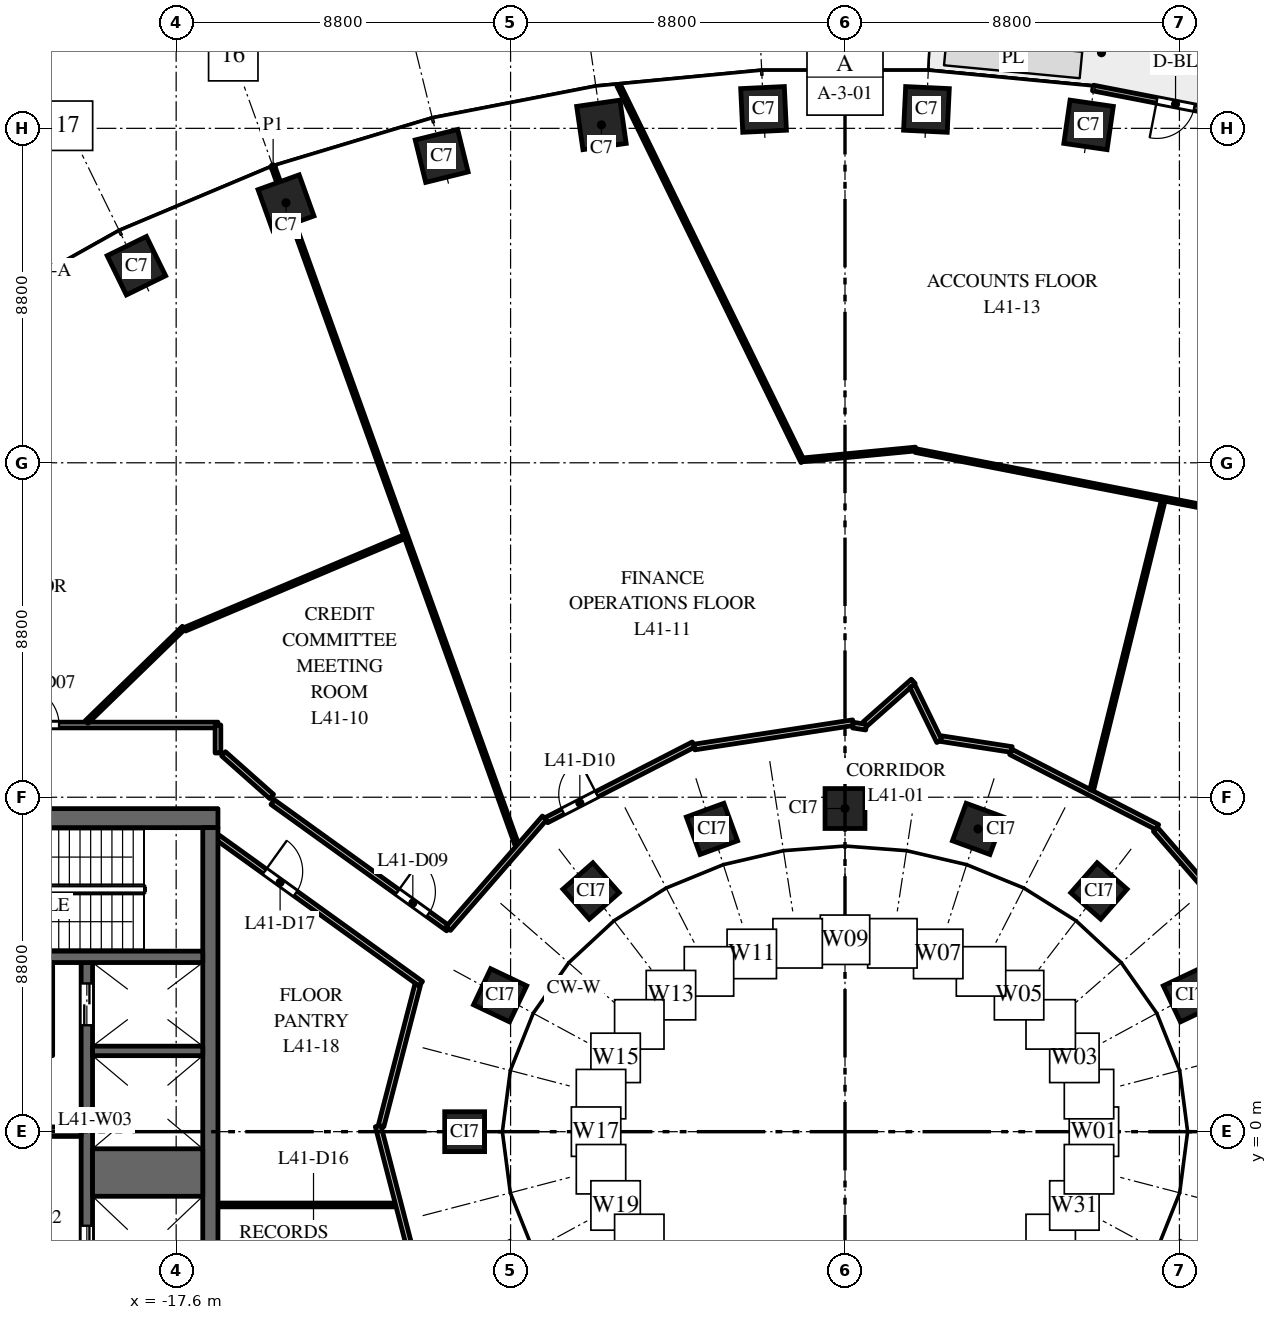
"""IFC4 building model, lengths in metres.
Left out: names, types, materials, properties, quantities, classifications, styles, units other than length and angle.
Written with IfcOpenShell. Run it as: python <this file> out.ifc"""

import sys

from ifc_helpers import new_model, si_unit, direction, frame, frame_2d, origin, origin_2d, place, context, subcontext, project, spatial, rectangle, extrude, element, fill, save


model = new_model("IFC4")
c1 = context("Model", 3, precision=1e-05, world=origin(), true_north=direction((0.0, 1.0)))
c2 = subcontext(c1, "Body", "Model", "MODEL_VIEW")
j1 = project(units=[si_unit("LENGTHUNIT", "METRE"), si_unit("PLANEANGLEUNIT", "RADIAN")], contexts=[c1])
p1 = place(None, origin())
s1 = spatial("IfcSite", under=j1, at=p1, CompositionType="ELEMENT")
p2 = place(p1, origin())
s2 = spatial("IfcBuilding", under=s1, at=p2, CompositionType="ELEMENT")
p3 = place(p2, frame((0.0, 0.0, 178.0)))
s3 = spatial("IfcBuildingStorey", under=s2, at=p3, CompositionType="ELEMENT", Elevation=178.0)
for number, where, z_axis, x_axis in (
    (1, (6.409, 26.491, 0.0), (0.0, 0.0, 1.0), (-0.99, 0.143, 0.0)),
    (2, (2.143, 26.898, 0.0), (0.0, 0.0, 1.0), (-0.999, 0.048, 0.0)),
    (3, (-2.143, 26.898, 0.0), (0.0, 0.0, 1.0), (-0.999, -0.048, 0.0)),
    (4, (-6.409, 26.491, 0.0), (0.0, 0.0, 1.0), (-0.99, -0.143, 0.0)),
    (5, (-10.613, 25.674, 0.0), (0.0, 0.0, 1.0), (-0.971, -0.24, 0.0)),
    (6, (-14.709, 24.441, 0.0), (0.0, 0.0, 1.0), (-0.941, -0.338, 0.0)),
    (7, (-18.646, 22.785, 0.0), (0.0, 0.0, 1.0), (-0.898, -0.439, 0.0)),
):
    element("IfcColumn", number, at=place(p3, frame(where, z_axis=z_axis, x_axis=x_axis)), inside=s3, PredefinedType="COLUMN", context=c2, shape_type="SweptSolid", body=[
        extrude(rectangle(XDim=1.15, YDim=1.15, at=origin_2d()), origin(), (0.0, 0.0, 1.0), 4.0),
    ])
for number, where, z_axis, x_axis in (
    (8, (9.076, 3.588, 0.0), (0.0, 0.0, 1.0), (-0.429, 0.903, 0.0)),
    (9, (6.682, 6.334, 0.0), (0.0, 0.0, 1.0), (-0.751, 0.66, 0.0)),
    (10, (3.501, 7.967, 0.0), (0.0, 0.0, 1.0), (-0.939, 0.344, 0.0)),
    (11, (0.0, 8.503, 0.0), (0.0, 0.0, 1.0), (-1.0, 0.0, 0.0)),
    (12, (-3.501, 7.967, 0.0), (0.0, 0.0, 1.0), (-0.939, -0.344, 0.0)),
    (13, (-6.682, 6.334, 0.0), (0.0, 0.0, 1.0), (-0.751, -0.66, 0.0)),
    (14, (-9.076, 3.588, 0.0), (0.0, 0.0, 1.0), (-0.429, -0.903, 0.0)),
    (15, (-10.008, 0.0, 0.0), (0.0, 0.0, 1.0), (0.0, -1.0, 0.0)),
):
    element("IfcColumn", number, at=place(p3, frame(where, z_axis=z_axis, x_axis=x_axis)), inside=s3, PredefinedType="COLUMN", context=c2, shape_type="SweptSolid", body=[
        extrude(rectangle(XDim=1.05, YDim=1.05, at=origin_2d()), origin(), (0.0, 0.0, 1.0), 4.0),
    ])
p4 = place(p3, frame((-16.5, 8.25, 0.0), z_axis=(0.0, 0.0, 1.0), x_axis=(-1.0, 0.0, 0.0)))
e16 = element("IfcWall", 16, at=p4, inside=s3, PredefinedType="SHEAR", context=c2, shape_type="SweptSolid", body=[
    extrude(rectangle(XDim=15.0, YDim=0.5, at=frame_2d((7.5, 0.0))), origin(), (0.0, 0.0, 1.0), 3.7),
])
p5 = place(p4, frame((6.9, 0.0, 0.0)))
e17 = element("IfcOpeningElement", 17, at=p5, cuts=e16, PredefinedType="OPENING", context=c2, shape_type="SweptSolid", body=[
    extrude(rectangle(XDim=1.2, YDim=2.1, at=frame_2d((0.6, 1.05))), frame((0.0, 0.26, 0.0), z_axis=(0.0, -1.0, 0.0), x_axis=(1.0, 0.0, 0.0)), (0.0, 0.0, 1.0), 0.52),
])
p6 = place(p4, frame((12.95, 0.0, 0.0)))
e18 = element("IfcOpeningElement", 18, at=p6, cuts=e16, PredefinedType="OPENING", context=c2, shape_type="SweptSolid", body=[
    extrude(rectangle(XDim=0.9, YDim=2.1, at=frame_2d((0.45, 1.05))), frame((0.0, 0.26, 0.0), z_axis=(0.0, -1.0, 0.0), x_axis=(1.0, 0.0, 0.0)), (0.0, 0.0, 1.0), 0.52),
])
p7 = place(p3, frame((-19.95, -4.45, 0.0), z_axis=(0.0, 0.0, 1.0), x_axis=(0.0, 1.0, 0.0)))
e19 = element("IfcWall", 19, at=p7, inside=s3, PredefinedType="SHEAR", context=c2, shape_type="SweptSolid", body=[
    extrude(rectangle(XDim=8.9, YDim=0.3, at=frame_2d((4.45, 0.0))), origin(), (0.0, 0.0, 1.0), 3.7),
])
p8 = place(p7, frame((0.775, 0.0, 0.0)))
e20 = element("IfcOpeningElement", 20, at=p8, cuts=e19, PredefinedType="OPENING", context=c2, shape_type="SweptSolid", body=[
    extrude(rectangle(XDim=1.2, YDim=2.1, at=frame_2d((0.6, 1.05))), frame((0.0, 0.16, 0.0), z_axis=(0.0, -1.0, 0.0), x_axis=(1.0, 0.0, 0.0)), (0.0, 0.0, 1.0), 0.32),
])
p9 = place(p7, frame((7.25, 0.0, 0.0)))
e21 = element("IfcOpeningElement", 21, at=p9, cuts=e19, PredefinedType="OPENING", context=c2, shape_type="SweptSolid", body=[
    extrude(rectangle(XDim=1.1, YDim=2.1, at=frame_2d((0.55, 1.05))), frame((0.0, 0.16, 0.0), z_axis=(0.0, -1.0, 0.0), x_axis=(1.0, 0.0, 0.0)), (0.0, 0.0, 1.0), 0.32),
])
p10 = place(p3, frame((-20.1, 0.0, 0.0), z_axis=(0.0, 0.0, 1.0), x_axis=(-1.0, 0.0, 0.0)))
e22 = element("IfcWall", 22, at=p10, inside=s3, PredefinedType="SHEAR", context=c2, shape_type="SweptSolid", body=[
    extrude(rectangle(XDim=3.28, YDim=0.25, at=frame_2d((1.64, 0.0))), origin(), (0.0, 0.0, 1.0), 3.7),
])
p11 = place(p3, frame((-16.7, -8.0, 0.0), z_axis=(0.0, 0.0, 1.0), x_axis=(0.0, 1.0, 0.0)))
e23 = element("IfcWall", 23, at=p11, inside=s3, PredefinedType="SHEAR", context=c2, shape_type="SweptSolid", body=[
    extrude(rectangle(XDim=16.0, YDim=0.4, at=frame_2d((8.0, 0.0))), origin(), (0.0, 0.0, 1.0), 3.7),
])
p12 = place(p3, frame((-16.9, -1.075, 0.0), z_axis=(0.0, 0.0, 1.0), x_axis=(-1.0, 0.0, 0.0)))
e24 = element("IfcWall", 24, at=p12, inside=s3, PredefinedType="SHEAR", context=c2, shape_type="SweptSolid", body=[
    extrude(rectangle(XDim=2.9, YDim=1.25, at=frame_2d((1.45, 0.0))), origin(), (0.0, 0.0, 1.0), 3.7),
])
p13 = place(p3, frame((-16.9, 2.125, 0.0), z_axis=(0.0, 0.0, 1.0), x_axis=(-1.0, 0.0, 0.0)))
e25 = element("IfcWall", 25, at=p13, inside=s3, PredefinedType="SHEAR", context=c2, shape_type="SweptSolid", body=[
    extrude(rectangle(XDim=2.9, YDim=0.25, at=frame_2d((1.45, 0.0))), origin(), (0.0, 0.0, 1.0), 3.7),
])
p14 = place(p3, frame((-16.9, 4.6, 0.0), z_axis=(0.0, 0.0, 1.0), x_axis=(-1.0, 0.0, 0.0)))
e26 = element("IfcWall", 26, at=p14, inside=s3, PredefinedType="SHEAR", context=c2, shape_type="SweptSolid", body=[
    extrude(rectangle(XDim=6.18, YDim=0.3, at=frame_2d((3.09, 0.0))), origin(), (0.0, 0.0, 1.0), 3.7),
])
p15 = place(p14, frame((4.9, 0.0, 0.0)))
e27 = element("IfcOpeningElement", 27, at=p15, cuts=e26, PredefinedType="OPENING", context=c2, shape_type="SweptSolid", body=[
    extrude(rectangle(XDim=1.1, YDim=2.1, at=frame_2d((0.55, 1.05))), frame((0.0, 0.16, 0.0), z_axis=(0.0, -1.0, 0.0), x_axis=(1.0, 0.0, 0.0)), (0.0, 0.0, 1.0), 0.32),
])
p16 = place(p3, frame((-20.85, 2.125, 0.0), z_axis=(0.0, 0.0, 1.0), x_axis=(-1.0, 0.0, 0.0)))
e28 = element("IfcWall", 28, at=p16, inside=s3, PredefinedType="SHEAR", context=c2, shape_type="SweptSolid", body=[
    extrude(rectangle(XDim=2.53, YDim=0.25, at=frame_2d((1.265, 0.0))), origin(), (0.0, 0.0, 1.0), 3.7),
])
p17 = place(p3, frame((-20.975, 2.25, 0.0), z_axis=(0.0, 0.0, 1.0), x_axis=(0.0, 1.0, 0.0)))
e29 = element("IfcWall", 29, at=p17, inside=s3, PredefinedType="SHEAR", context=c2, shape_type="SweptSolid", body=[
    extrude(rectangle(XDim=2.2, YDim=0.25, at=frame_2d((1.1, 0.0))), origin(), (0.0, 0.0, 1.0), 3.7),
])
p18 = place(p3, frame((10.871, 26.617, 0.0), z_axis=(0.0, 0.0, 1.0), x_axis=(-0.981631174778, 0.190788460615, 0.0)))
e30 = element("IfcWall", 30, at=p18, inside=s3, PredefinedType="STANDARD", context=c2, shape_type="SweptSolid", body=[
    extrude(rectangle(XDim=4.426, YDim=0.15, at=frame_2d((2.213, 0.0))), origin(), (0.0, 0.0, 1.0), 3.7),
])
p19 = place(p18, frame((1.713, 0.0, 0.0)))
e31 = element("IfcOpeningElement", 31, at=p19, cuts=e30, PredefinedType="OPENING", context=c2, shape_type="SweptSolid", body=[
    extrude(rectangle(XDim=1.0, YDim=2.4, at=frame_2d((0.5, 1.2))), frame((0.0, 0.085, 0.0), z_axis=(0.0, -1.0, 0.0), x_axis=(1.0, 0.0, 0.0)), (0.0, 0.0, 1.0), 0.17),
])
p20 = place(p3, frame((-31.5, 10.7, 0.0), z_axis=(0.0, 0.0, 1.0), x_axis=(1.0, 0.0, 0.0)))
e32 = element("IfcWall", 32, at=p20, inside=s3, PredefinedType="PARTITIONING", context=c2, shape_type="SweptSolid", body=[
    extrude(rectangle(XDim=15.0, YDim=0.15, at=frame_2d((7.5, 0.0))), origin(), (0.0, 0.0, 1.0), 3.1),
])
p21 = place(p20, frame((9.819, 0.0, 0.0)))
e33 = element("IfcOpeningElement", 33, at=p21, cuts=e32, PredefinedType="OPENING", context=c2, shape_type="SweptSolid", body=[
    extrude(rectangle(XDim=1.0, YDim=2.1, at=frame_2d((0.5, 1.05))), frame((0.0, 0.085, 0.0), z_axis=(0.0, -1.0, 0.0), x_axis=(1.0, 0.0, 0.0)), (0.0, 0.0, 1.0), 0.17),
])
p22 = place(p3, frame((-19.957, 10.778, 0.0), z_axis=(0.0, 0.0, 1.0), x_axis=(0.717304806733, 0.696759509614, 0.0)))
e34 = element("IfcWall", 34, at=p22, inside=s3, PredefinedType="PARTITIONING", context=c2, shape_type="SweptSolid", body=[
    extrude(rectangle(XDim=3.565, YDim=0.1, at=frame_2d((1.782, 0.0))), origin(), (0.0, 0.0, 1.0), 2.75),
])
p23 = place(p3, frame((-17.372, 13.219, 0.0), z_axis=(0.0, 0.0, 1.0), x_axis=(0.921428289763, 0.38854846136, 0.0)))
e35 = element("IfcWall", 35, at=p23, inside=s3, PredefinedType="PARTITIONING", context=c2, shape_type="SweptSolid", body=[
    extrude(rectangle(XDim=6.262, YDim=0.1, at=frame_2d((3.131, 0.0))), origin(), (0.0, 0.0, 1.0), 2.85),
])
p24 = place(p3, frame((-16.5, -1.928, 0.0), z_axis=(0.0, 0.0, 1.0), x_axis=(1.0, 0.0, 0.0)))
e36 = element("IfcWall", 36, at=p24, inside=s3, PredefinedType="PARTITIONING", context=c2, shape_type="SweptSolid", body=[
    extrude(rectangle(XDim=4.672, YDim=0.1, at=frame_2d((2.336, 0.0))), origin(), (0.0, 0.0, 1.0), 3.7),
])
p25 = place(p3, frame((-16.5, 9.964, 0.0), z_axis=(0.0, 0.0, 1.0), x_axis=(0.0, 1.0, 0.0)))
e37 = element("IfcWall", 37, at=p25, inside=s3, PredefinedType="PARTITIONING", context=c2, shape_type="SweptSolid", body=[
    extrude(rectangle(XDim=0.736, YDim=0.15, at=frame_2d((0.368, 0.0))), origin(), (0.0, 0.0, 1.0), 3.7),
])
p26 = place(p3, frame((-16.5, 7.735, 0.0), z_axis=(0.0, 0.0, 1.0), x_axis=(0.811616692984, -0.584190331715, 0.0)))
e38 = element("IfcWall", 38, at=p26, inside=s3, PredefinedType="PARTITIONING", context=c2, shape_type="SweptSolid", body=[
    extrude(rectangle(XDim=6.578, YDim=0.15, at=frame_2d((3.289, 0.0))), origin(), (0.0, 0.0, 1.0), 3.7),
])
p27 = place(p26, frame((1.515, 0.0, 0.0)))
e39 = element("IfcOpeningElement", 39, at=p27, cuts=e38, PredefinedType="OPENING", context=c2, shape_type="SweptSolid", body=[
    extrude(rectangle(XDim=1.0, YDim=2.1, at=frame_2d((0.5, 1.05))), frame((0.0, 0.085, 0.0), z_axis=(0.0, -1.0, 0.0), x_axis=(1.0, 0.0, 0.0)), (0.0, 0.0, 1.0), 0.17),
])
p28 = place(p3, frame((-15.061, 8.671, 0.0), z_axis=(0.0, 0.0, 1.0), x_axis=(0.811697765448, -0.584077681106, 0.0)))
e40 = element("IfcWall", 40, at=p28, inside=s3, PredefinedType="PARTITIONING", context=c2, shape_type="SweptSolid", body=[
    extrude(rectangle(XDim=5.694, YDim=0.15, at=frame_2d((2.847, 0.0))), origin(), (0.0, 0.0, 1.0), 3.7),
])
p29 = place(p28, frame((4.044, 0.0, 0.0)))
e41 = element("IfcOpeningElement", 41, at=p29, cuts=e40, PredefinedType="OPENING", context=c2, shape_type="SweptSolid", body=[
    extrude(rectangle(XDim=1.0, YDim=2.1, at=frame_2d((0.5, 1.05))), frame((0.0, 0.085, 0.0), z_axis=(0.0, -1.0, 0.0), x_axis=(1.0, 0.0, 0.0)), (0.0, 0.0, 1.0), 0.17),
])
p30 = place(p3, frame((-15.048, 25.383, 0.0), z_axis=(0.0, 0.0, 1.0), x_axis=(0.33832146485, -0.941030598026, 0.0)))
e42 = element("IfcWall", 42, at=p30, inside=s3, PredefinedType="PARTITIONING", context=c2, shape_type="SweptSolid", body=[
    extrude(rectangle(XDim=18.964, YDim=0.1, at=frame_2d((9.482, 0.0))), origin(), (0.0, 0.0, 1.0), 2.85),
])
p31 = place(p3, frame((-12.286, 0.149, 0.0), z_axis=(0.0, 0.0, 1.0), x_axis=(0.250998973278, -0.96798735292, 0.0)))
e43 = element("IfcWall", 43, at=p31, inside=s3, PredefinedType="PARTITIONING", context=c2, shape_type="SweptSolid", body=[
    extrude(rectangle(XDim=4.143, YDim=0.15, at=frame_2d((2.071, 0.0))), origin(), (0.0, 0.0, 1.0), 3.7),
])
p32 = place(p3, frame((-12.208, 0.149, 0.0), z_axis=(0.0, 0.0, 1.0), x_axis=(0.250840636591, 0.968028395779, 0.0)))
e44 = element("IfcWall", 44, at=p32, inside=s3, PredefinedType="PARTITIONING", context=c2, shape_type="SweptSolid", body=[
    extrude(rectangle(XDim=3.835, YDim=0.15, at=frame_2d((1.917, 0.0))), origin(), (0.0, 0.0, 1.0), 3.7),
])
p33 = place(p3, frame((-10.439, 5.345, 0.0), z_axis=(0.0, 0.0, 1.0), x_axis=(0.656405809938, 0.754407988213, 0.0)))
e45 = element("IfcWall", 45, at=p33, inside=s3, PredefinedType="PARTITIONING", context=c2, shape_type="SweptSolid", body=[
    extrude(rectangle(XDim=3.859, YDim=0.15, at=frame_2d((1.929, 0.0))), origin(), (0.0, 0.0, 1.0), 2.75),
])
p34 = place(p3, frame((-7.859, 8.196, 0.0), z_axis=(0.0, 0.0, 1.0), x_axis=(0.889405670308, 0.457118752213, 0.0)))
e46 = element("IfcWall", 46, at=p34, inside=s3, PredefinedType="PARTITIONING", context=c2, shape_type="SweptSolid", body=[
    extrude(rectangle(XDim=4.355, YDim=0.15, at=frame_2d((2.178, 0.0))), origin(), (0.0, 0.0, 1.0), 2.85),
])
p35 = place(p34, frame((0.491, 0.0, 0.0)))
e47 = element("IfcOpeningElement", 47, at=p35, cuts=e46, PredefinedType="OPENING", context=c2, shape_type="SweptSolid", body=[
    extrude(rectangle(XDim=1.0, YDim=2.1, at=frame_2d((0.5, 1.05))), frame((0.0, 0.085, 0.0), z_axis=(0.0, -1.0, 0.0), x_axis=(1.0, 0.0, 0.0)), (0.0, 0.0, 1.0), 0.17),
])
p36 = place(p3, frame((-5.958, 27.538, 0.0), z_axis=(0.0, 0.0, 1.0), x_axis=(0.439175599961, -0.89840124243, 0.0)))
e48 = element("IfcWall", 48, at=p36, inside=s3, PredefinedType="PARTITIONING", context=c2, shape_type="SweptSolid", body=[
    extrude(rectangle(XDim=11.032, YDim=0.1, at=frame_2d((5.516, 0.0))), origin(), (0.0, 0.0, 1.0), 2.85),
])
p37 = place(p3, frame((-3.964, 10.121, 0.0), z_axis=(0.0, 0.0, 1.0), x_axis=(0.988463044045, 0.151462241359, 0.0)))
e49 = element("IfcWall", 49, at=p37, inside=s3, PredefinedType="PARTITIONING", context=c2, shape_type="SweptSolid", body=[
    extrude(rectangle(XDim=4.225, YDim=0.15, at=frame_2d((2.112, 0.0))), origin(), (0.0, 0.0, 1.0), 2.85),
])
p38 = place(p3, frame((-1.083, 17.68, 0.0), z_axis=(0.0, 0.0, 1.0), x_axis=(0.995437741406, 0.095413327081, 0.0)))
e50 = element("IfcWall", 50, at=p38, inside=s3, PredefinedType="PARTITIONING", context=c2, shape_type="SweptSolid", body=[
    extrude(rectangle(XDim=2.955, YDim=0.1, at=frame_2d((1.478, 0.0))), origin(), (0.0, 0.0, 1.0), 3.7),
])
p39 = place(p3, frame((0.212, 10.697, 0.0), z_axis=(0.0, 0.0, 1.0), x_axis=(0.988347357149, -0.152215313344, 0.0)))
e51 = element("IfcWall", 51, at=p39, inside=s3, PredefinedType="PARTITIONING", context=c2, shape_type="SweptSolid", body=[
    extrude(rectangle(XDim=0.348, YDim=0.15, at=frame_2d((0.174, 0.0))), origin(), (0.0, 0.0, 1.0), 3.7),
])
p40 = place(p3, frame((0.526, 10.725, 0.0), z_axis=(0.0, 0.0, 1.0), x_axis=(0.748837178436, 0.662754011826, 0.0)))
e52 = element("IfcWall", 52, at=p40, inside=s3, PredefinedType="PARTITIONING", context=c2, shape_type="SweptSolid", body=[
    extrude(rectangle(XDim=1.696, YDim=0.15, at=frame_2d((0.848, 0.0))), origin(), (0.0, 0.0, 1.0), 3.7),
])
p41 = place(p3, frame((1.857, 17.921, 0.0), z_axis=(0.0, 0.0, 1.0), x_axis=(0.98153666983, -0.191274059348, 0.0)))
e53 = element("IfcWall", 53, at=p41, inside=s3, PredefinedType="PARTITIONING", context=c2, shape_type="SweptSolid", body=[
    extrude(rectangle(XDim=10.147, YDim=0.1, at=frame_2d((5.074, 0.0))), origin(), (0.0, 0.0, 1.0), 2.85),
])
p42 = place(p3, frame((1.772, 11.727, 0.0), z_axis=(0.0, 0.0, 1.0), x_axis=(0.439231774218, -0.898373779959, 0.0)))
e54 = element("IfcWall", 54, at=p42, inside=s3, PredefinedType="PARTITIONING", context=c2, shape_type="SweptSolid", body=[
    extrude(rectangle(XDim=1.619, YDim=0.15, at=frame_2d((0.809, 0.0))), origin(), (0.0, 0.0, 1.0), 2.85),
])
p43 = place(p3, frame((2.526, 10.342, 0.0), z_axis=(0.0, 0.0, 1.0), x_axis=(0.988398649241, -0.151881895491, 0.0)))
e55 = element("IfcWall", 55, at=p43, inside=s3, PredefinedType="PARTITIONING", context=c2, shape_type="SweptSolid", body=[
    extrude(rectangle(XDim=1.884, YDim=0.15, at=frame_2d((0.942, 0.0))), origin(), (0.0, 0.0, 1.0), 2.85),
])
p44 = place(p3, frame((4.367, 9.991, 0.0), z_axis=(0.0, 0.0, 1.0), x_axis=(0.889480321924, -0.456973475061, 0.0)))
e56 = element("IfcWall", 56, at=p44, inside=s3, PredefinedType="PARTITIONING", context=c2, shape_type="SweptSolid", body=[
    extrude(rectangle(XDim=4.331, YDim=0.15, at=frame_2d((2.165, 0.0))), origin(), (0.0, 0.0, 1.0), 2.85),
])
p45 = place(p3, frame((6.491, 8.988, 0.0), z_axis=(0.0, 0.0, 1.0), x_axis=(0.239904638237, 0.970796458869, 0.0)))
e57 = element("IfcWall", 57, at=p45, inside=s3, PredefinedType="PARTITIONING", context=c2, shape_type="SweptSolid", body=[
    extrude(rectangle(XDim=7.841, YDim=0.1, at=frame_2d((3.92, 0.0))), origin(), (0.0, 0.0, 1.0), 2.85),
])
p46 = place(p3, frame((8.172, 7.952, 0.0), z_axis=(0.0, 0.0, 1.0), x_axis=(0.656169966724, -0.754613129206, 0.0)))
e58 = element("IfcWall", 58, at=p46, inside=s3, PredefinedType="PARTITIONING", context=c2, shape_type="SweptSolid", body=[
    extrude(rectangle(XDim=3.455, YDim=0.15, at=frame_2d((1.727, 0.0))), origin(), (0.0, 0.0, 1.0), 2.75),
])
p47 = place(p3, frame((-16.352, 9.942, 0.0), z_axis=(0.0, 0.0, 1.0), x_axis=(0.747926695066, -0.663781333579, 0.0)))
e59 = element("IfcWall", 59, at=p47, inside=s3, PredefinedType="PARTITIONING", context=c2, shape_type="SweptSolid", body=[
    extrude(rectangle(XDim=1.691, YDim=0.15, at=frame_2d((0.846, 0.0))), origin(), (0.0, 0.0, 1.0), 3.7),
])
p48 = place(p8, origin())
e60 = element("IfcDoor", 60, at=p48, inside=s3, OperationType="DOUBLE_DOOR_SLIDING", PredefinedType="DOOR", context=c2, shape_type="SweptSolid", body=[
    extrude(rectangle(XDim=1.2, YDim=2.1, at=frame_2d((0.6, 1.05))), frame((0.0, 0.025, 0.0), z_axis=(0.0, -1.0, 0.0), x_axis=(1.0, 0.0, 0.0)), (0.0, 0.0, 1.0), 0.05),
])
fill(e20, e60)
p49 = place(p9, origin())
e61 = element("IfcDoor", 61, at=p49, inside=s3, OperationType="DOUBLE_DOOR_SLIDING", PredefinedType="DOOR", context=c2, shape_type="SweptSolid", body=[
    extrude(rectangle(XDim=1.1, YDim=2.1, at=frame_2d((0.55, 1.05))), frame((0.0, 0.025, 0.0), z_axis=(0.0, -1.0, 0.0), x_axis=(1.0, 0.0, 0.0)), (0.0, 0.0, 1.0), 0.05),
])
fill(e21, e61)
p50 = place(p19, origin())
e62 = element("IfcDoor", 62, at=p50, inside=s3, OperationType="SINGLE_SWING_RIGHT", PredefinedType="DOOR", context=c2, shape_type="SweptSolid", body=[
    extrude(rectangle(XDim=1.0, YDim=2.4, at=frame_2d((0.5, 1.2))), frame((0.0, 0.025, 0.0), z_axis=(0.0, -1.0, 0.0), x_axis=(1.0, 0.0, 0.0)), (0.0, 0.0, 1.0), 0.05),
])
fill(e31, e62)
p51 = place(p21, origin())
e63 = element("IfcDoor", 63, at=p51, inside=s3, OperationType="SINGLE_SWING_LEFT", PredefinedType="DOOR", context=c2, shape_type="SweptSolid", body=[
    extrude(rectangle(XDim=1.0, YDim=2.1, at=frame_2d((0.5, 1.05))), frame((0.0, 0.025, 0.0), z_axis=(0.0, -1.0, 0.0), x_axis=(1.0, 0.0, 0.0)), (0.0, 0.0, 1.0), 0.05),
])
fill(e33, e63)
p52 = place(p29, origin())
e64 = element("IfcDoor", 64, at=p52, inside=s3, OperationType="SINGLE_SWING_LEFT", PredefinedType="DOOR", context=c2, shape_type="SweptSolid", body=[
    extrude(rectangle(XDim=1.0, YDim=2.1, at=frame_2d((0.5, 1.05))), frame((0.0, 0.025, 0.0), z_axis=(0.0, -1.0, 0.0), x_axis=(1.0, 0.0, 0.0)), (0.0, 0.0, 1.0), 0.05),
])
fill(e41, e64)
p53 = place(p35, origin())
e65 = element("IfcDoor", 65, at=p53, inside=s3, OperationType="SINGLE_SWING_RIGHT", PredefinedType="DOOR", context=c2, shape_type="SweptSolid", body=[
    extrude(rectangle(XDim=1.0, YDim=2.1, at=frame_2d((0.5, 1.05))), frame((0.0, 0.025, 0.0), z_axis=(0.0, -1.0, 0.0), x_axis=(1.0, 0.0, 0.0)), (0.0, 0.0, 1.0), 0.05),
])
fill(e47, e65)
p54 = place(p27, origin())
e66 = element("IfcDoor", 66, at=p54, inside=s3, OperationType="SINGLE_SWING_LEFT", PredefinedType="DOOR", context=c2, shape_type="SweptSolid", body=[
    extrude(rectangle(XDim=1.0, YDim=2.1, at=frame_2d((0.5, 1.05))), frame((0.0, 0.025, 0.0), z_axis=(0.0, -1.0, 0.0), x_axis=(1.0, 0.0, 0.0)), (0.0, 0.0, 1.0), 0.05),
])
fill(e39, e66)
save(model, sys.argv[1])
